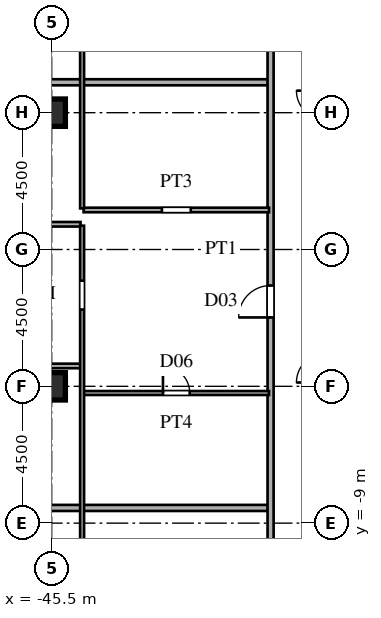
"""IFC4 building model, lengths in metres.
Left out: names, types, materials, properties, quantities, classifications, styles, units other than length and angle.
Written with IfcOpenShell. Run it as: python <this file> out.ifc"""

import sys

from ifc_helpers import new_model, si_unit, direction, frame, frame_2d, origin, origin_2d, place, context, subcontext, project, spatial, rectangle, i_section, extrude, source, transform, mapped, element, fill, save


model = new_model("IFC4")
c1 = context("Model", 3, precision=1e-05, world=origin(), true_north=direction((0.0, 1.0)))
c2 = subcontext(c1, "Body", "Model", "MODEL_VIEW")
j1 = project(units=[si_unit("LENGTHUNIT", "METRE"), si_unit("PLANEANGLEUNIT", "RADIAN")], contexts=[c1])
p1 = place(None, origin())
s1 = spatial("IfcSite", under=j1, at=p1, CompositionType="ELEMENT")
p2 = place(p1, origin())
s2 = spatial("IfcBuilding", under=s1, at=p2, CompositionType="ELEMENT")
p3 = place(p2, frame((0.0, 0.0, 44.1)))
s3 = spatial("IfcBuildingStorey", under=s2, at=p3, CompositionType="ELEMENT", Elevation=44.1)
m1 = source(origin(), c2, "Body", "SweptSolid", [
    extrude(i_section(OverallWidth=0.9, OverallDepth=0.9, WebThickness=0.036, FlangeThickness=0.055, at=origin_2d()), origin(), (0.0, 0.0, 1.0), 3.6),
])
for number, where, z_axis, x_axis in (
    (1, (-45.5, -4.5, 0.0), (0.0, 0.0, 1.0), (1.0, 0.0, 0.0)),
    (2, (-45.5, 4.5, 0.0), (0.0, 0.0, 1.0), (1.0, 0.0, 0.0)),
):
    element("IfcColumn", number, at=place(p3, frame(where, z_axis=z_axis, x_axis=x_axis)), inside=s3, PredefinedType="COLUMN", context=c2, shape_type="MappedRepresentation", body=[
        mapped(m1, transform((0.0, 0.0, 0.0), scale=1.0)),
    ])
p4 = place(p3, frame((-72.505, -8.5, 0.0), z_axis=(0.0, 0.0, 1.0), x_axis=(1.0, 0.0, 0.0)))
e3 = element("IfcWall", 3, at=p4, inside=s3, PredefinedType="PARTITIONING", context=c2, shape_type="SweptSolid", body=[
    extrude(rectangle(XDim=34.125, YDim=0.2, at=frame_2d((17.062, 0.0))), origin(), (0.0, 0.0, 1.0), 3.38),
])
p5 = place(p3, frame((-44.45, -4.72, 0.0), z_axis=(0.0, 0.0, 1.0), x_axis=(1.0, 0.0, 0.0)))
e4 = element("IfcWall", 4, at=p5, inside=s3, PredefinedType="PARTITIONING", context=c2, shape_type="SweptSolid", body=[
    extrude(rectangle(XDim=6.1, YDim=0.13, at=frame_2d((3.05, 0.0))), origin(), (0.0, 0.0, 1.0), 3.38),
])
p6 = place(p5, frame((2.61, 0.0, 0.0)))
e5 = element("IfcOpeningElement", 5, at=p6, cuts=e4, PredefinedType="OPENING", context=c2, shape_type="SweptSolid", body=[
    extrude(rectangle(XDim=0.88, YDim=2.1, at=frame_2d((0.44, 1.05))), frame((0.0, 0.075, 0.0), z_axis=(0.0, -1.0, 0.0), x_axis=(1.0, 0.0, 0.0)), (0.0, 0.0, 1.0), 0.15),
])
p7 = place(p3, frame((-72.535, -3.83, 0.0), z_axis=(0.0, 0.0, 1.0), x_axis=(1.0, 0.0, 0.0)))
e6 = element("IfcWall", 6, at=p7, inside=s3, PredefinedType="PARTITIONING", context=c2, shape_type="SweptSolid", body=[
    extrude(rectangle(XDim=27.985, YDim=0.15, at=frame_2d((13.992, 0.0))), origin(), (0.0, 0.0, 1.0), 3.38),
])
p8 = place(p7, frame((22.56, 0.0, 0.0)))
e7 = element("IfcOpeningElement", 7, at=p8, cuts=e6, PredefinedType="OPENING", context=c2, shape_type="SweptSolid", body=[
    extrude(rectangle(XDim=0.95, YDim=2.15, at=frame_2d((0.475, 1.075))), frame((0.0, 0.085, 0.0), z_axis=(0.0, -1.0, 0.0), x_axis=(1.0, 0.0, 0.0)), (0.0, 0.0, 1.0), 0.17),
])
p9 = place(p7, frame((14.71, 0.0, 0.0)))
e8 = element("IfcOpeningElement", 8, at=p9, cuts=e6, PredefinedType="OPENING", context=c2, shape_type="SweptSolid", body=[
    extrude(rectangle(XDim=0.95, YDim=2.15, at=frame_2d((0.475, 1.075))), frame((0.0, 0.085, 0.0), z_axis=(0.0, -1.0, 0.0), x_axis=(1.0, 0.0, 0.0)), (0.0, 0.0, 1.0), 0.17),
])
p10 = place(p3, frame((-72.535, 0.83, 0.0), z_axis=(0.0, 0.0, 1.0), x_axis=(1.0, 0.0, 0.0)))
e9 = element("IfcWall", 9, at=p10, inside=s3, PredefinedType="PARTITIONING", context=c2, shape_type="SweptSolid", body=[
    extrude(rectangle(XDim=27.985, YDim=0.15, at=frame_2d((13.992, 0.0))), origin(), (0.0, 0.0, 1.0), 3.38),
])
p11 = place(p10, frame((22.56, 0.0, 0.0)))
e10 = element("IfcOpeningElement", 10, at=p11, cuts=e9, PredefinedType="OPENING", context=c2, shape_type="SweptSolid", body=[
    extrude(rectangle(XDim=0.95, YDim=2.15, at=frame_2d((0.475, 1.075))), frame((0.0, 0.085, 0.0), z_axis=(0.0, -1.0, 0.0), x_axis=(1.0, 0.0, 0.0)), (0.0, 0.0, 1.0), 0.17),
])
p12 = place(p10, frame((14.71, 0.0, 0.0)))
e11 = element("IfcOpeningElement", 11, at=p12, cuts=e9, PredefinedType="OPENING", context=c2, shape_type="SweptSolid", body=[
    extrude(rectangle(XDim=0.95, YDim=2.15, at=frame_2d((0.475, 1.075))), frame((0.0, 0.085, 0.0), z_axis=(0.0, -1.0, 0.0), x_axis=(1.0, 0.0, 0.0)), (0.0, 0.0, 1.0), 0.17),
])
p13 = place(p3, frame((-44.45, 1.3, 0.0), z_axis=(0.0, 0.0, 1.0), x_axis=(1.0, 0.0, 0.0)))
e12 = element("IfcWall", 12, at=p13, inside=s3, PredefinedType="PARTITIONING", context=c2, shape_type="SweptSolid", body=[
    extrude(rectangle(XDim=6.1, YDim=0.15, at=frame_2d((3.05, 0.0))), origin(), (0.0, 0.0, 1.0), 3.38),
])
p14 = place(p13, frame((2.575, 0.0, 0.0)))
e13 = element("IfcOpeningElement", 13, at=p14, cuts=e12, PredefinedType="OPENING", context=c2, shape_type="SweptSolid", body=[
    extrude(rectangle(XDim=0.95, YDim=2.15, at=frame_2d((0.475, 1.075))), frame((0.0, 0.085, 0.0), z_axis=(0.0, -1.0, 0.0), x_axis=(1.0, 0.0, 0.0)), (0.0, 0.0, 1.0), 0.17),
])
p15 = place(p3, frame((-72.505, 5.5, 0.0), z_axis=(0.0, 0.0, 1.0), x_axis=(1.0, 0.0, 0.0)))
e14 = element("IfcWall", 14, at=p15, inside=s3, PredefinedType="PARTITIONING", context=c2, shape_type="SweptSolid", body=[
    extrude(rectangle(XDim=34.125, YDim=0.2, at=frame_2d((17.062, 0.0))), origin(), (0.0, 0.0, 1.0), 3.38),
])
p16 = place(p3, frame((-44.5, -21.368, 0.0), z_axis=(0.0, 0.0, 1.0), x_axis=(0.0, 1.0, 0.0)))
e15 = element("IfcWall", 15, at=p16, inside=s3, PredefinedType="PARTITIONING", context=c2, shape_type="SweptSolid", body=[
    extrude(rectangle(XDim=22.151, YDim=0.13, at=frame_2d((11.075, 0.0))), origin(), (0.0, 0.0, 1.0), 3.38),
])
p17 = place(p16, frame((8.932, 0.0, 0.0)))
e16 = element("IfcOpeningElement", 16, at=p17, cuts=e15, PredefinedType="OPENING", context=c2, shape_type="SweptSolid", body=[
    extrude(rectangle(XDim=0.95, YDim=2.15, at=frame_2d((0.475, 1.075))), frame((0.0, 0.075, 0.0), z_axis=(0.0, -1.0, 0.0), x_axis=(1.0, 0.0, 0.0)), (0.0, 0.0, 1.0), 0.15),
])
p18 = place(p16, frame((0.724, 0.0, 0.0)))
e17 = element("IfcOpeningElement", 17, at=p18, cuts=e15, PredefinedType="OPENING", context=c2, shape_type="SweptSolid", body=[
    extrude(rectangle(XDim=0.95, YDim=2.15, at=frame_2d((0.475, 1.075))), frame((0.0, 0.075, 0.0), z_axis=(0.0, -1.0, 0.0), x_axis=(1.0, 0.0, 0.0)), (0.0, 0.0, 1.0), 0.15),
])
p19 = place(p16, frame((19.393, 0.0, 0.0)))
e18 = element("IfcOpeningElement", 18, at=p19, cuts=e15, PredefinedType="OPENING", context=c2, shape_type="SweptSolid", body=[
    extrude(rectangle(XDim=0.95, YDim=2.15, at=frame_2d((0.475, 1.075))), frame((0.0, 0.075, 0.0), z_axis=(0.0, -1.0, 0.0), x_axis=(1.0, 0.0, 0.0)), (0.0, 0.0, 1.0), 0.15),
])
p20 = place(p3, frame((-44.5, 1.352, 0.0), z_axis=(0.0, 0.0, 1.0), x_axis=(0.0, 1.0, 0.0)))
e19 = element("IfcWall", 19, at=p20, inside=s3, PredefinedType="PARTITIONING", context=c2, shape_type="SweptSolid", body=[
    extrude(rectangle(XDim=20.016, YDim=0.13, at=frame_2d((10.008, 0.0))), origin(), (0.0, 0.0, 1.0), 3.38),
])
p21 = place(p20, frame((8.101, 0.0, 0.0)))
e20 = element("IfcOpeningElement", 20, at=p21, cuts=e19, PredefinedType="OPENING", context=c2, shape_type="SweptSolid", body=[
    extrude(rectangle(XDim=0.95, YDim=2.15, at=frame_2d((0.475, 1.075))), frame((0.0, 0.075, 0.0), z_axis=(0.0, -1.0, 0.0), x_axis=(1.0, 0.0, 0.0)), (0.0, 0.0, 1.0), 0.15),
])
p22 = place(p20, frame((9.601, 0.0, 0.0)))
e21 = element("IfcOpeningElement", 21, at=p22, cuts=e19, PredefinedType="OPENING", context=c2, shape_type="SweptSolid", body=[
    extrude(rectangle(XDim=0.95, YDim=2.15, at=frame_2d((0.475, 1.075))), frame((0.0, 0.075, 0.0), z_axis=(0.0, -1.0, 0.0), x_axis=(1.0, 0.0, 0.0)), (0.0, 0.0, 1.0), 0.15),
])
p23 = place(p3, frame((-38.3, -15.515, 0.0), z_axis=(0.0, 0.0, 1.0), x_axis=(0.0, 1.0, 0.0)))
e22 = element("IfcWall", 22, at=p23, inside=s3, PredefinedType="PARTITIONING", context=c2, shape_type="SweptSolid", body=[
    extrude(rectangle(XDim=31.03, YDim=0.2, at=frame_2d((15.515, 0.0))), origin(), (0.0, 0.0, 1.0), 3.38),
])
p24 = place(p23, frame((2.345, 0.0, 0.0)))
e23 = element("IfcOpeningElement", 23, at=p24, cuts=e22, PredefinedType="OPENING", context=c2, shape_type="SweptSolid", body=[
    extrude(rectangle(XDim=1.05, YDim=2.25, at=frame_2d((0.525, 1.125))), frame((0.0, 0.11, 0.0), z_axis=(0.0, -1.0, 0.0), x_axis=(1.0, 0.0, 0.0)), (0.0, 0.0, 1.0), 0.22),
])
p25 = place(p23, frame((13.28, 0.0, 0.0)))
e24 = element("IfcOpeningElement", 24, at=p25, cuts=e22, PredefinedType="OPENING", context=c2, shape_type="SweptSolid", body=[
    extrude(rectangle(XDim=1.05, YDim=2.25, at=frame_2d((0.525, 1.125))), frame((0.0, 0.11, 0.0), z_axis=(0.0, -1.0, 0.0), x_axis=(1.0, 0.0, 0.0)), (0.0, 0.0, 1.0), 0.22),
])
p26 = place(p23, frame((25.567, 0.0, 0.0)))
e25 = element("IfcOpeningElement", 25, at=p26, cuts=e22, PredefinedType="OPENING", context=c2, shape_type="SweptSolid", body=[
    extrude(rectangle(XDim=1.05, YDim=2.25, at=frame_2d((0.525, 1.125))), frame((0.0, 0.11, 0.0), z_axis=(0.0, -1.0, 0.0), x_axis=(1.0, 0.0, 0.0)), (0.0, 0.0, 1.0), 0.22),
])
m2 = source(origin(), c2, "Body", "SweptSolid", [
    extrude(rectangle(XDim=0.88, YDim=2.1, at=frame_2d((0.44, 1.05))), frame((0.0, 0.025, 0.0), z_axis=(0.0, -1.0, 0.0), x_axis=(1.0, 0.0, 0.0)), (0.0, 0.0, 1.0), 0.05),
])
p27 = place(p6, origin())
e26 = element("IfcDoor", 26, at=p27, inside=s3, OperationType="SINGLE_SWING_LEFT", PredefinedType="DOOR", context=c2, shape_type="MappedRepresentation", body=[
    mapped(m2, transform((0.0, 0.0, 0.0), scale=1.0)),
])
fill(e5, e26)
m3 = source(origin(), c2, "Body", "SweptSolid", [
    extrude(rectangle(XDim=1.05, YDim=2.25, at=frame_2d((0.525, 1.125))), frame((0.0, 0.025, 0.0), z_axis=(0.0, -1.0, 0.0), x_axis=(1.0, 0.0, 0.0)), (0.0, 0.0, 1.0), 0.05),
])
p28 = place(p25, origin())
e27 = element("IfcDoor", 27, at=p28, inside=s3, OperationType="SINGLE_SWING_LEFT", PredefinedType="DOOR", context=c2, shape_type="MappedRepresentation", body=[
    mapped(m3, transform((0.0, 0.0, 0.0), scale=1.0)),
])
fill(e24, e27)
save(model, sys.argv[1])
